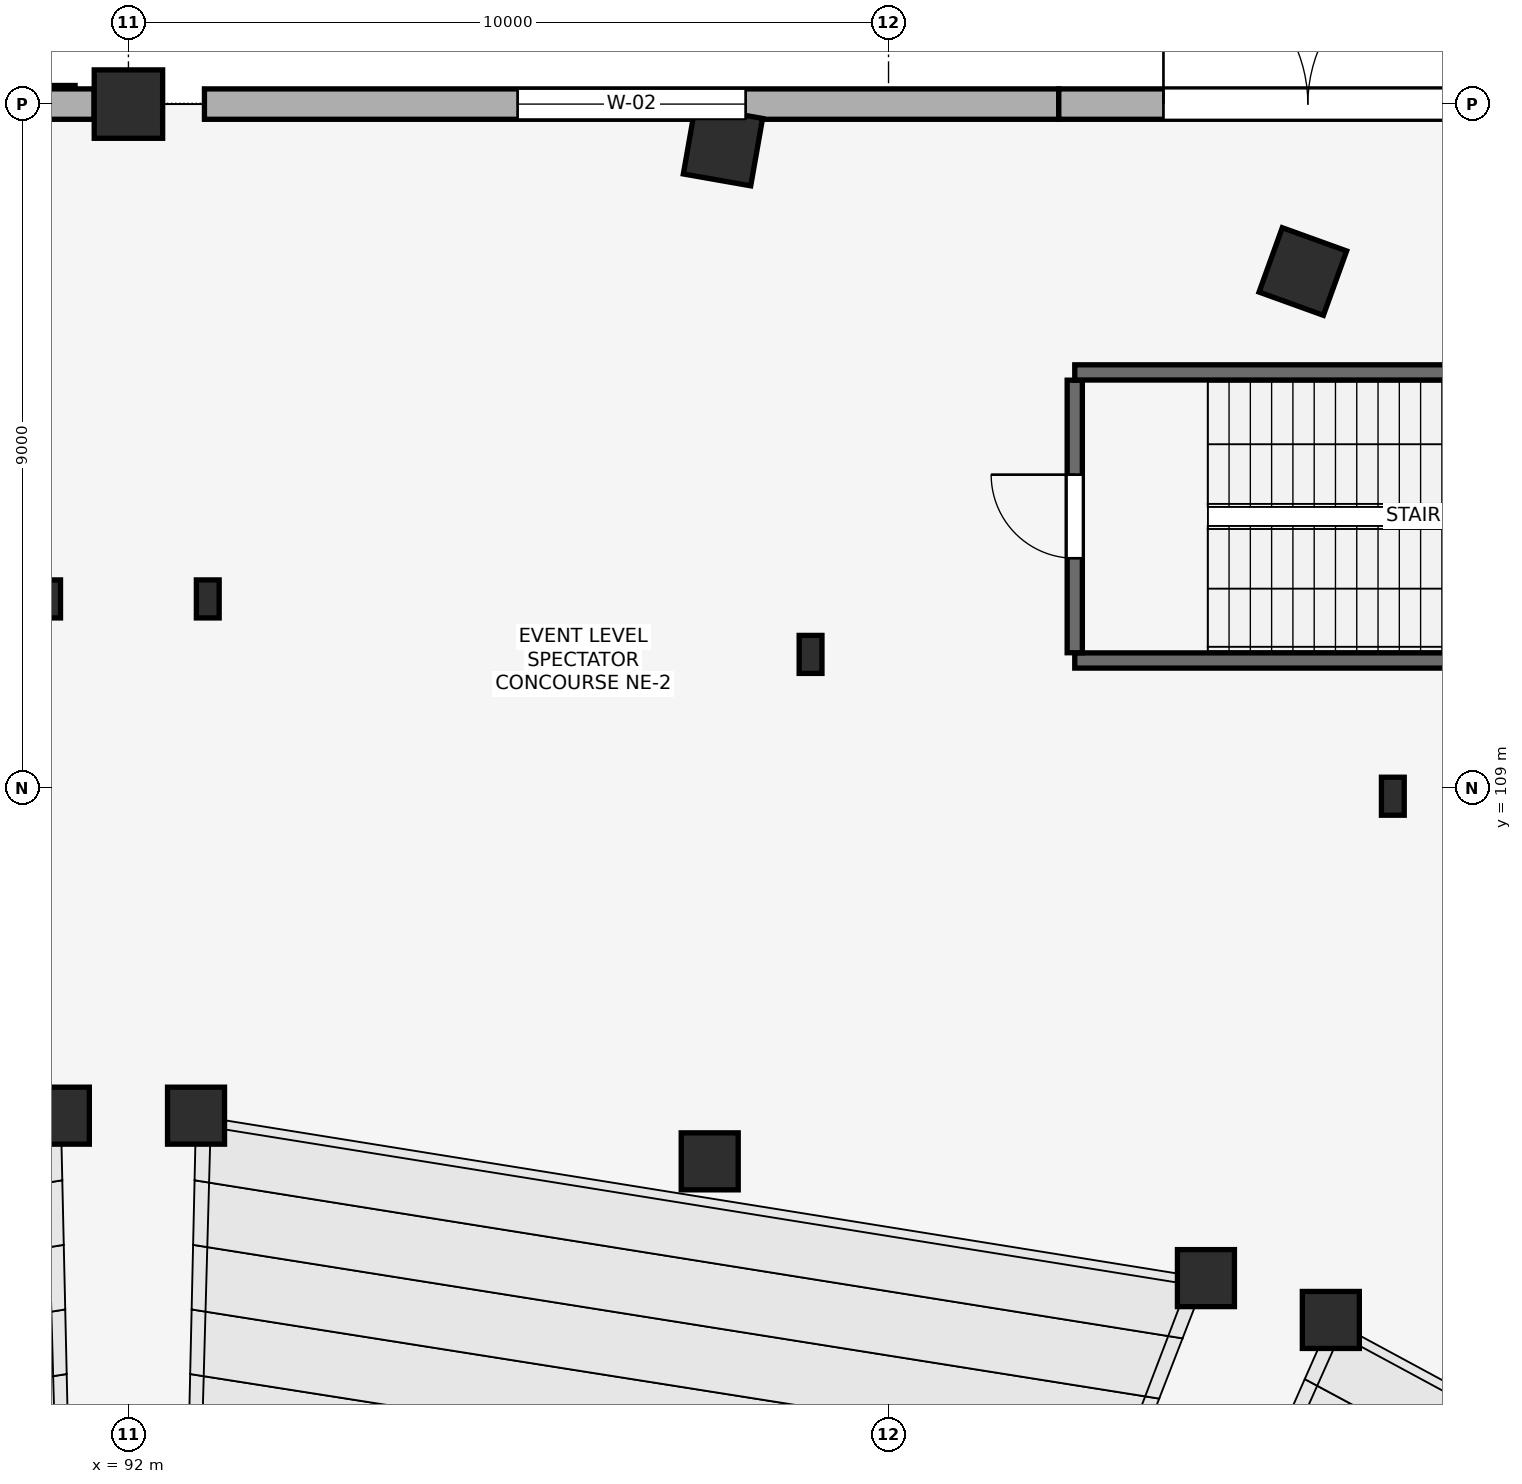
"""IFC4 building model, lengths in metres.
Left out: names, types, materials, properties, quantities, classifications, styles, units other than length and angle.
Written with IfcOpenShell. Run it as: python <this file> out.ifc"""

import sys

from ifc_helpers import new_model, si_unit, direction, frame, frame_2d, origin, origin_2d, place, context, subcontext, project, spatial, rectangle, i_section, extrude, element, fill, save


model = new_model("IFC4")
c1 = context("Model", 3, precision=1e-05, world=origin(), true_north=direction((0.0, 1.0)))
c2 = subcontext(c1, "Body", "Model", "MODEL_VIEW")
j1 = project(units=[si_unit("LENGTHUNIT", "METRE"), si_unit("PLANEANGLEUNIT", "RADIAN")], contexts=[c1])
p1 = place(None, origin())
s1 = spatial("IfcSite", under=j1, at=p1, CompositionType="ELEMENT")
p2 = place(p1, origin())
s2 = spatial("IfcBuilding", under=s1, at=p2, CompositionType="ELEMENT")
p3 = place(p2, origin())
s3 = spatial("IfcBuildingStorey", under=s2, at=p3, CompositionType="ELEMENT", Elevation=0.0)
for number, where, z_axis, x_axis in (
    (1, (107.451, 115.798, 0.0), (0.0, 0.0, 1.0), (0.34, 0.941, 0.0)),
    (2, (99.822, 117.446, 0.0), (0.0, 0.0, 1.0), (0.173, 0.985, 0.0)),
    (3, (92.0, 118.0, 0.0), (0.0, 0.0, 1.0), (0.0, 1.0, 0.0)),
):
    element("IfcColumn", number, at=place(p3, frame(where, z_axis=z_axis, x_axis=x_axis)), inside=s3, PredefinedType="COLUMN", context=c2, shape_type="SweptSolid", body=[
        extrude(rectangle(XDim=0.9, YDim=0.9, at=origin_2d()), origin(), (0.0, 0.0, 1.0), 5.4),
    ])
for number, where, z_axis, x_axis in (
    (4, (107.819, 102.004, 0.0), (0.0, 0.0, 1.0), (1.0, 0.0, 0.0)),
    (5, (106.176, 102.555, 0.0), (0.0, 0.0, 1.0), (1.0, 0.0, 0.0)),
):
    element("IfcColumn", number, at=place(p3, frame(where, z_axis=z_axis, x_axis=x_axis)), inside=s3, PredefinedType="COLUMN", context=c2, shape_type="SweptSolid", body=[
        extrude(rectangle(XDim=0.75, YDim=0.75, at=origin_2d()), origin(), (0.0, 0.0, 1.0), 5.4),
    ])
p4 = place(p3, frame((108.635, 108.895, 0.0), z_axis=(0.0, 0.0, 1.0), x_axis=(1.0, 0.0, 0.0)))
e6 = element("IfcColumn", 6, at=p4, inside=s3, PredefinedType="COLUMN", context=c2, shape_type="SweptSolid", body=[
    extrude(i_section(OverallWidth=0.3, OverallDepth=0.5, WebThickness=0.014, FlangeThickness=0.028, FilletRadius=0.027, at=origin_2d()), origin(), (0.0, 0.0, 1.0), 5.4),
])
p5 = place(p3, frame((92.889, 104.692, 0.0), z_axis=(0.0, 0.0, 1.0), x_axis=(1.0, 0.0, 0.0)))
e7 = element("IfcColumn", 7, at=p5, inside=s3, PredefinedType="COLUMN", context=c2, shape_type="SweptSolid", body=[
    extrude(rectangle(XDim=0.75, YDim=0.75, at=origin_2d()), origin(), (0.0, 0.0, 1.0), 5.4),
])
p6 = place(p3, frame((93.044, 111.49, 0.0), z_axis=(0.0, 0.0, 1.0), x_axis=(1.0, 0.0, 0.0)))
e8 = element("IfcColumn", 8, at=p6, inside=s3, PredefinedType="COLUMN", context=c2, shape_type="SweptSolid", body=[
    extrude(i_section(OverallWidth=0.3, OverallDepth=0.5, WebThickness=0.014, FlangeThickness=0.028, FilletRadius=0.027, at=origin_2d()), origin(), (0.0, 0.0, 1.0), 5.4),
])
p7 = place(p3, frame((91.111, 104.692, 0.0), z_axis=(0.0, 0.0, 1.0), x_axis=(1.0, 0.0, 0.0)))
e9 = element("IfcColumn", 9, at=p7, inside=s3, PredefinedType="COLUMN", context=c2, shape_type="SweptSolid", body=[
    extrude(rectangle(XDim=0.75, YDim=0.75, at=origin_2d()), origin(), (0.0, 0.0, 1.0), 5.4),
])
p8 = place(p3, frame((90.956, 111.49, 0.0), z_axis=(0.0, 0.0, 1.0), x_axis=(1.0, 0.0, 0.0)))
e10 = element("IfcColumn", 10, at=p8, inside=s3, PredefinedType="COLUMN", context=c2, shape_type="SweptSolid", body=[
    extrude(i_section(OverallWidth=0.3, OverallDepth=0.5, WebThickness=0.014, FlangeThickness=0.028, FilletRadius=0.027, at=origin_2d()), origin(), (0.0, 0.0, 1.0), 5.4),
])
p9 = place(p3, frame((99.647, 104.091, 0.0), z_axis=(0.0, 0.0, 1.0), x_axis=(1.0, 0.0, 0.0)))
e11 = element("IfcColumn", 11, at=p9, inside=s3, PredefinedType="COLUMN", context=c2, shape_type="SweptSolid", body=[
    extrude(rectangle(XDim=0.75, YDim=0.75, at=origin_2d()), origin(), (0.0, 0.0, 1.0), 5.4),
])
p10 = place(p3, frame((100.974, 110.76, 0.0), z_axis=(0.0, 0.0, 1.0), x_axis=(1.0, 0.0, 0.0)))
e12 = element("IfcColumn", 12, at=p10, inside=s3, PredefinedType="COLUMN", context=c2, shape_type="SweptSolid", body=[
    extrude(i_section(OverallWidth=0.3, OverallDepth=0.5, WebThickness=0.014, FlangeThickness=0.028, FilletRadius=0.027, at=origin_2d()), origin(), (0.0, 0.0, 1.0), 5.4),
])
p11 = place(p3, frame((81.76, 118.0, 0.0), z_axis=(0.0, 0.0, 1.0), x_axis=(1.0, 0.0, 0.0)))
e13 = element("IfcWall", 13, at=p11, inside=s3, PredefinedType="STANDARD", context=c2, shape_type="SweptSolid", body=[
    extrude(rectangle(XDim=9.788, YDim=0.4, at=frame_2d((4.894, 0.0))), origin(), (0.0, 0.0, 1.0), 4.431),
])
p12 = place(p11, frame((2.994, 0.0, 0.0)))
e14 = element("IfcOpeningElement", 14, at=p12, cuts=e13, PredefinedType="OPENING", context=c2, shape_type="SweptSolid", body=[
    extrude(rectangle(XDim=3.8, YDim=2.8, at=frame_2d((1.9, 1.4))), frame((0.0, 0.21, 0.0), z_axis=(0.0, -1.0, 0.0), x_axis=(1.0, 0.0, 0.0)), (0.0, 0.0, 1.0), 0.42),
])
p13 = place(p3, frame((93.0, 118.0, 0.0), z_axis=(0.0, 0.0, 1.0), x_axis=(1.0, 0.0, 0.0)))
e15 = element("IfcWall", 15, at=p13, inside=s3, PredefinedType="STANDARD", context=c2, shape_type="SweptSolid", body=[
    extrude(rectangle(XDim=11.24, YDim=0.4, at=frame_2d((5.62, 0.0))), origin(), (0.0, 0.0, 1.0), 4.431),
])
p14 = place(p13, frame((4.12, 0.0, 0.85)))
e16 = element("IfcOpeningElement", 16, at=p14, cuts=e15, PredefinedType="OPENING", context=c2, shape_type="SweptSolid", body=[
    extrude(rectangle(XDim=3.0, YDim=2.4, at=frame_2d((1.5, 1.2))), frame((0.0, 0.21, 0.0), z_axis=(0.0, -1.0, 0.0), x_axis=(1.0, 0.0, 0.0)), (0.0, 0.0, 1.0), 0.42),
])
p15 = place(p3, frame((104.24, 118.0, 0.0), z_axis=(0.0, 0.0, 1.0), x_axis=(1.0, 0.0, 0.0)))
e17 = element("IfcWall", 17, at=p15, inside=s3, PredefinedType="STANDARD", context=c2, shape_type="SweptSolid", body=[
    extrude(rectangle(XDim=6.555, YDim=0.4, at=frame_2d((3.278, 0.0))), origin(), (0.0, 0.0, 1.0), 5.12),
])
p16 = place(p15, frame((1.377, 0.0, 0.0)))
e18 = element("IfcOpeningElement", 18, at=p16, cuts=e17, PredefinedType="OPENING", context=c2, shape_type="SweptSolid", body=[
    extrude(rectangle(XDim=3.8, YDim=2.8, at=frame_2d((1.9, 1.4))), frame((0.0, 0.21, 0.0), z_axis=(0.0, -1.0, 0.0), x_axis=(1.0, 0.0, 0.0)), (0.0, 0.0, 1.0), 0.42),
])
p17 = place(p3, frame((104.45, 110.68, 0.0), z_axis=(0.0, 0.0, 1.0), x_axis=(1.0, 0.0, 0.0)))
e19 = element("IfcWall", 19, at=p17, inside=s3, PredefinedType="SHEAR", context=c2, shape_type="SweptSolid", body=[
    extrude(rectangle(XDim=7.95, YDim=0.2, at=frame_2d((3.975, 0.0))), origin(), (0.0, 0.0, 1.0), 5.4),
])
p18 = place(p3, frame((104.45, 110.782, 0.0), z_axis=(0.0, 0.0, 1.0), x_axis=(0.0, 1.0, 0.0)))
e20 = element("IfcWall", 20, at=p18, inside=s3, PredefinedType="SHEAR", context=c2, shape_type="SweptSolid", body=[
    extrude(rectangle(XDim=3.586, YDim=0.2, at=frame_2d((1.793, 0.0))), origin(), (0.0, 0.0, 1.0), 5.4),
])
p19 = place(p18, frame((1.243, 0.0, 0.0)))
e21 = element("IfcOpeningElement", 21, at=p19, cuts=e20, PredefinedType="OPENING", context=c2, shape_type="SweptSolid", body=[
    extrude(rectangle(XDim=1.1, YDim=2.15, at=frame_2d((0.55, 1.075))), frame((0.0, 0.11, 0.0), z_axis=(0.0, -1.0, 0.0), x_axis=(1.0, 0.0, 0.0)), (0.0, 0.0, 1.0), 0.22),
])
p20 = place(p3, frame((104.45, 114.47, 0.0), z_axis=(0.0, 0.0, 1.0), x_axis=(1.0, 0.0, 0.0)))
e22 = element("IfcWall", 22, at=p20, inside=s3, PredefinedType="SHEAR", context=c2, shape_type="SweptSolid", body=[
    extrude(rectangle(XDim=7.95, YDim=0.2, at=frame_2d((3.975, 0.0))), origin(), (0.0, 0.0, 1.0), 5.4),
])
p21 = place(p14, origin())
e23 = element("IfcWindow", 23, at=p21, inside=s3, PartitioningType="SINGLE_PANEL", PredefinedType="WINDOW", context=c2, shape_type="SweptSolid", body=[
    extrude(rectangle(XDim=3.0, YDim=2.4, at=frame_2d((1.5, 1.2))), frame((0.0, 0.03, 0.0), z_axis=(0.0, -1.0, 0.0), x_axis=(1.0, 0.0, 0.0)), (0.0, 0.0, 1.0), 0.06),
])
fill(e16, e23)
p22 = place(p16, origin())
e24 = element("IfcDoor", 24, at=p22, inside=s3, OperationType="DOUBLE_DOOR_SINGLE_SWING", PredefinedType="DOOR", context=c2, shape_type="SweptSolid", body=[
    extrude(rectangle(XDim=3.8, YDim=2.8, at=frame_2d((1.9, 1.4))), frame((0.0, 0.025, 0.0), z_axis=(0.0, -1.0, 0.0), x_axis=(1.0, 0.0, 0.0)), (0.0, 0.0, 1.0), 0.05),
])
fill(e18, e24)
p23 = place(p19, frame((1.1, 0.0, 0.0), z_axis=(0.0, 0.0, 1.0), x_axis=(-1.0, 0.0, 0.0)))
e25 = element("IfcDoor", 25, at=p23, inside=s3, OperationType="SINGLE_SWING_LEFT", PredefinedType="DOOR", context=c2, shape_type="SweptSolid", body=[
    extrude(rectangle(XDim=1.1, YDim=2.15, at=frame_2d((0.55, 1.075))), frame((0.0, 0.025, 0.0), z_axis=(0.0, -1.0, 0.0), x_axis=(1.0, 0.0, 0.0)), (0.0, 0.0, 1.0), 0.05),
])
fill(e21, e25)
save(model, sys.argv[1])
